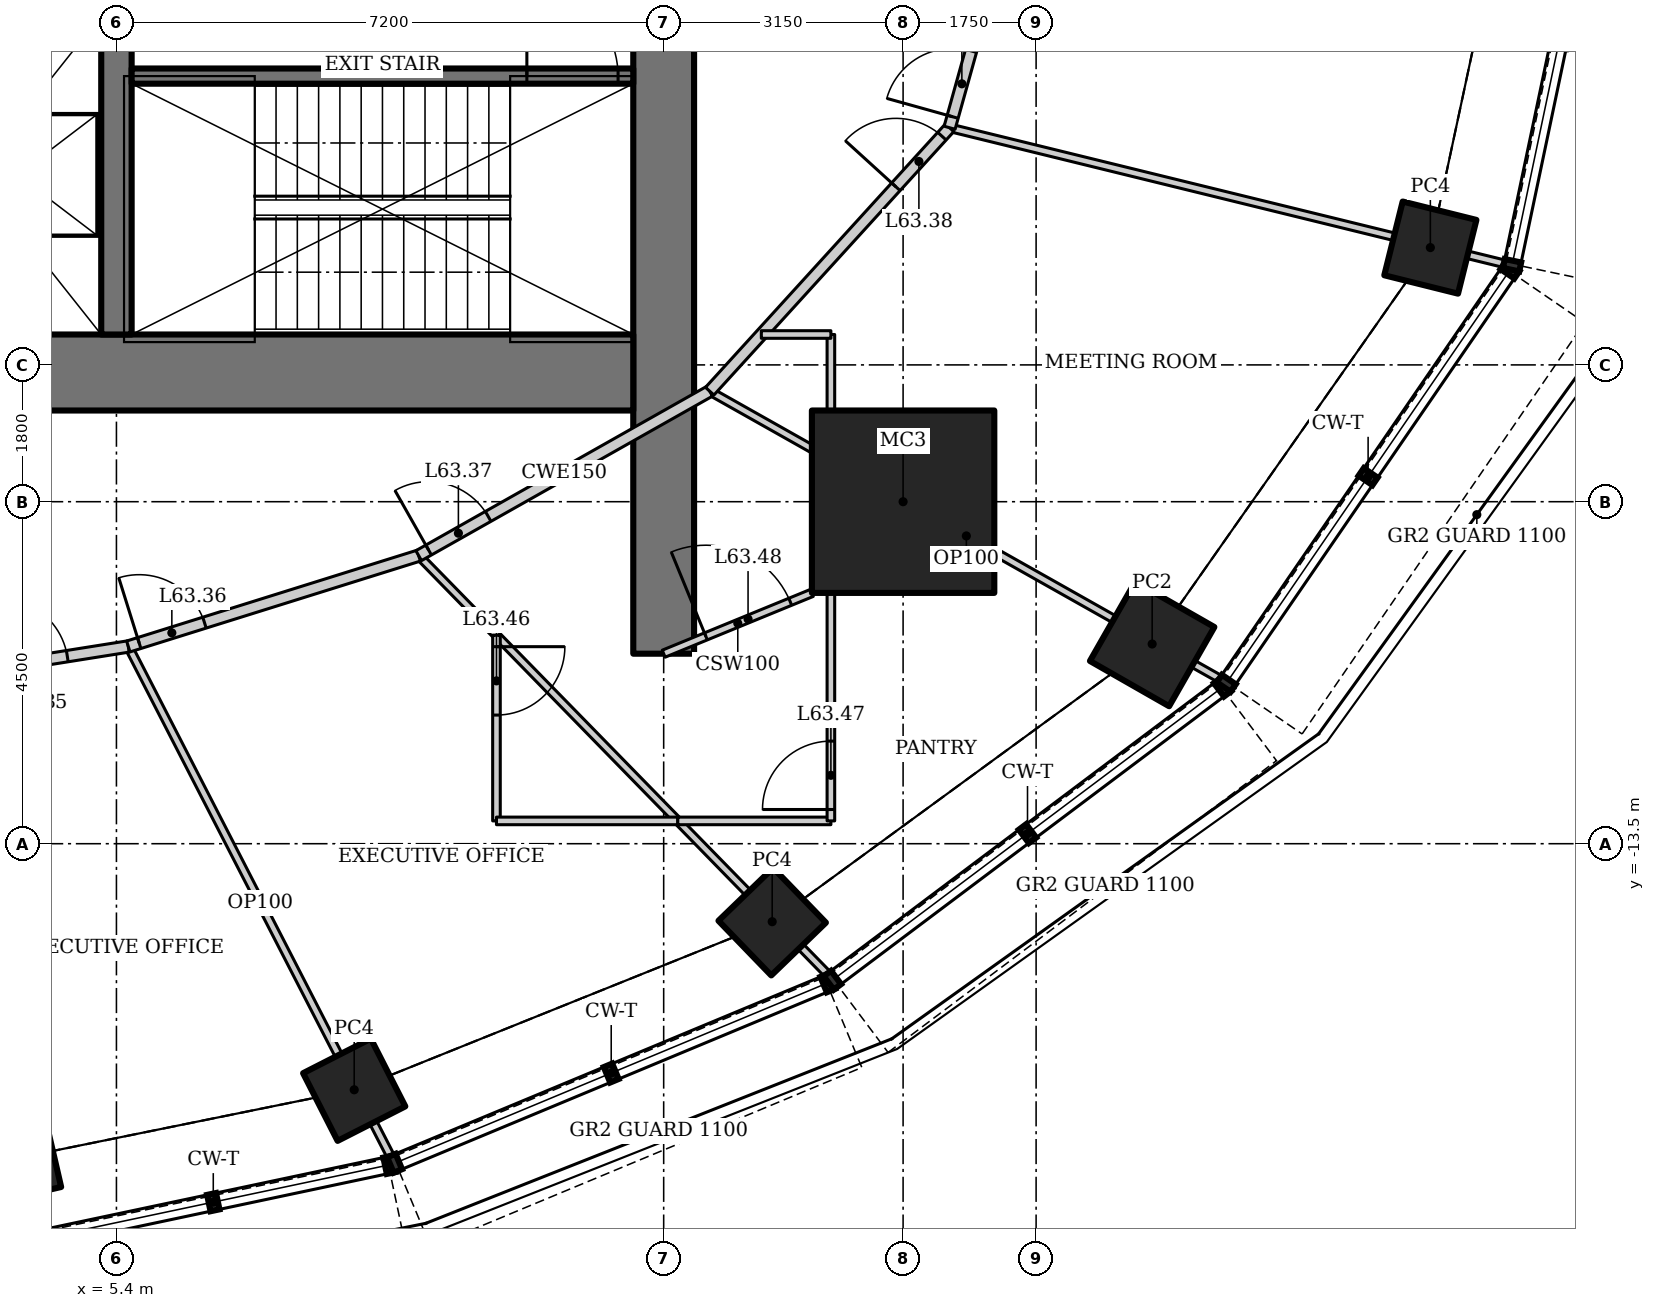
"""IFC4 building model, lengths in metres.
Left out: names, types, materials, properties, quantities, classifications, styles, units other than length and angle.
Written with IfcOpenShell. Run it as: python <this file> out.ifc"""

import sys

from ifc_helpers import new_model, si_unit, direction, frame, frame_2d, origin, origin_2d, place, context, subcontext, project, spatial, rectangle, hollow_rectangle, extrude, element, fill, save


model = new_model("IFC4")
c1 = context("Model", 3, precision=1e-05, world=origin(), true_north=direction((0.0, 1.0)))
c2 = subcontext(c1, "Body", "Model", "MODEL_VIEW")
j1 = project(units=[si_unit("LENGTHUNIT", "METRE"), si_unit("PLANEANGLEUNIT", "RADIAN")], contexts=[c1])
p1 = place(None, origin())
s1 = spatial("IfcSite", under=j1, at=p1, CompositionType="ELEMENT")
p2 = place(p1, origin())
s2 = spatial("IfcBuilding", under=s1, at=p2, CompositionType="ELEMENT")
p3 = place(p2, frame((0.0, 0.0, 270.4)))
s3 = spatial("IfcBuildingStorey", under=s2, at=p3, CompositionType="ELEMENT", Elevation=270.4)
p4 = place(p3, frame((15.75, -9.0, 0.0), z_axis=(0.0, 0.0, 1.0), x_axis=(1.0, 0.0, 0.0)))
e1 = element("IfcColumn", 1, at=p4, inside=s3, PredefinedType="COLUMN", context=c2, shape_type="SweptSolid", body=[
    extrude(hollow_rectangle(XDim=2.4, YDim=2.4, WallThickness=0.12, at=origin_2d()), origin(), (0.0, 0.0, 1.0), 4.5),
])
p5 = place(p3, frame((4.073, -17.642, 0.979), z_axis=(0.0, 0.0, 1.0), x_axis=(0.974370064785, 0.224951054344, 0.0)))
e2 = element("IfcColumn", 2, at=p5, inside=s3, PredefinedType="COLUMN", context=c2, shape_type="SweptSolid", body=[
    extrude(hollow_rectangle(XDim=1.0, YDim=1.0, WallThickness=0.08, at=origin_2d()), origin(), (0.0, 0.0, 1.0), 3.521),
])
p6 = place(p3, frame((8.528, -16.738, 0.969), z_axis=(0.0, 0.0, 1.0), x_axis=(0.891006524188, 0.45399049974, 0.0)))
e3 = element("IfcColumn", 3, at=p6, inside=s3, PredefinedType="COLUMN", context=c2, shape_type="SweptSolid", body=[
    extrude(hollow_rectangle(XDim=1.0, YDim=1.0, WallThickness=0.08, at=origin_2d()), origin(), (0.0, 0.0, 1.0), 3.531),
])
p7 = place(p3, frame((14.028, -14.526, 0.947), z_axis=(0.0, 0.0, 1.0), x_axis=(0.719339800339, 0.694658370459, 0.0)))
e4 = element("IfcColumn", 4, at=p7, inside=s3, PredefinedType="COLUMN", context=c2, shape_type="SweptSolid", body=[
    extrude(hollow_rectangle(XDim=1.0, YDim=1.0, WallThickness=0.08, at=origin_2d()), origin(), (0.0, 0.0, 1.0), 3.553),
])
p8 = place(p3, frame((19.027, -10.873, 1.103), z_axis=(0.0, 0.0, 1.0), x_axis=(0.496139221777, 0.86824298017, 0.0)))
e5 = element("IfcColumn", 5, at=p8, inside=s3, PredefinedType="COLUMN", context=c2, shape_type="SweptSolid", body=[
    extrude(hollow_rectangle(XDim=1.2, YDim=1.2, WallThickness=0.1, at=origin_2d()), origin(), (0.0, 0.0, 1.0), 3.397),
])
p9 = place(p3, frame((22.687, -5.656, 0.892), z_axis=(0.0, 0.0, 1.0), x_axis=(0.2419218956, 0.970295726276, 0.0)))
e6 = element("IfcColumn", 6, at=p9, inside=s3, PredefinedType="COLUMN", context=c2, shape_type="SweptSolid", body=[
    extrude(hollow_rectangle(XDim=1.0, YDim=1.0, WallThickness=0.08, at=origin_2d()), origin(), (0.0, 0.0, 1.0), 3.608),
])
p10 = place(p3, frame((12.6, -11.0, 0.0), z_axis=(0.0, 0.0, 1.0), x_axis=(0.0, 1.0, 0.0)))
e7 = element("IfcWall", 7, at=p10, inside=s3, PredefinedType="SHEAR", context=c2, shape_type="SweptSolid", body=[
    extrude(rectangle(XDim=22.0, YDim=0.8, at=frame_2d((11.0, 0.0))), origin(), (0.0, 0.0, 1.0), 4.5),
])
p11 = place(p10, frame((10.1, 0.0, 0.0)))
e8 = element("IfcOpeningElement", 8, at=p11, cuts=e7, PredefinedType="OPENING", context=c2, shape_type="SweptSolid", body=[
    extrude(rectangle(XDim=1.8, YDim=2.1, at=frame_2d((0.9, 1.05))), frame((0.0, 0.41, 0.0), z_axis=(0.0, -1.0, 0.0), x_axis=(1.0, 0.0, 0.0)), (0.0, 0.0, 1.0), 0.82),
])
p12 = place(p3, frame((-12.2, -7.3, 0.0), z_axis=(0.0, 0.0, 1.0), x_axis=(1.0, 0.0, 0.0)))
e9 = element("IfcWall", 9, at=p12, inside=s3, PredefinedType="SHEAR", context=c2, shape_type="SweptSolid", body=[
    extrude(rectangle(XDim=24.4, YDim=1.0, at=frame_2d((12.2, 0.0))), origin(), (0.0, 0.0, 1.0), 4.5),
])
p13 = place(p3, frame((5.4, -6.8, 0.0), z_axis=(0.0, 0.0, 1.0), x_axis=(0.0, 1.0, 0.0)))
e10 = element("IfcWall", 10, at=p13, inside=s3, PredefinedType="SHEAR", context=c2, shape_type="SweptSolid", body=[
    extrude(rectangle(XDim=14.6, YDim=0.4, at=frame_2d((7.3, 0.0))), origin(), (0.0, 0.0, 1.0), 4.5),
])
p14 = place(p13, frame((5.9, 0.0, 0.0)))
e11 = element("IfcOpeningElement", 11, at=p14, cuts=e10, PredefinedType="OPENING", context=c2, shape_type="SweptSolid", body=[
    extrude(rectangle(XDim=1.8, YDim=2.1, at=frame_2d((0.9, 1.05))), frame((0.0, 0.21, 0.0), z_axis=(0.0, -1.0, 0.0), x_axis=(1.0, 0.0, 0.0)), (0.0, 0.0, 1.0), 0.42),
])
p15 = place(p3, frame((5.6, -3.4, 0.0), z_axis=(0.0, 0.0, 1.0), x_axis=(1.0, 0.0, 0.0)))
e12 = element("IfcWall", 12, at=p15, inside=s3, PredefinedType="SHEAR", context=c2, shape_type="SweptSolid", body=[
    extrude(rectangle(XDim=6.6, YDim=0.2, at=frame_2d((3.3, 0.0))), origin(), (0.0, 0.0, 1.0), 4.5),
])
p16 = place(p15, frame((5.2, 0.0, 0.0)))
e13 = element("IfcOpeningElement", 13, at=p16, cuts=e12, PredefinedType="OPENING", context=c2, shape_type="SweptSolid", body=[
    extrude(rectangle(XDim=1.2, YDim=2.1, at=frame_2d((0.6, 1.05))), frame((0.0, 0.11, 0.0), z_axis=(0.0, -1.0, 0.0), x_axis=(1.0, 0.0, 0.0)), (0.0, 0.0, 1.0), 0.22),
])
p17 = place(p3, frame((9.031, -17.657, 0.0), z_axis=(0.0, 0.0, 1.0), x_axis=(-0.457536153323, 0.889191019074, 0.0)))
e14 = element("IfcWall", 14, at=p17, inside=s3, PredefinedType="PARTITIONING", context=c2, shape_type="SweptSolid", body=[
    extrude(rectangle(XDim=7.594, YDim=0.1, at=frame_2d((3.797, 0.0))), origin(), (0.0, 0.0, 1.0), 3.593),
])
p18 = place(p3, frame((14.789, -15.251, 0.0), z_axis=(0.0, 0.0, 1.0), x_axis=(-0.698752653188, 0.71536335499, 0.0)))
e15 = element("IfcWall", 15, at=p18, inside=s3, PredefinedType="PARTITIONING", context=c2, shape_type="SweptSolid", body=[
    extrude(rectangle(XDim=7.746, YDim=0.1, at=frame_2d((3.873, 0.0))), origin(), (0.0, 0.0, 1.0), 3.723),
])
p19 = place(p3, frame((19.959, -11.355, 0.0), z_axis=(0.0, 0.0, 1.0), x_axis=(-0.871035125561, 0.491220734537, 0.0)))
e16 = element("IfcWall", 16, at=p19, inside=s3, PredefinedType="PARTITIONING", context=c2, shape_type="SweptSolid", body=[
    extrude(rectangle(XDim=7.753, YDim=0.1, at=frame_2d((3.877, 0.0))), origin(), (0.0, 0.0, 1.0), 3.824),
])
p20 = place(p3, frame((23.707, -5.881, 0.0), z_axis=(0.0, 0.0, 1.0), x_axis=(-0.971215212425, 0.238203717759, 0.0)))
e17 = element("IfcWall", 17, at=p20, inside=s3, PredefinedType="PARTITIONING", context=c2, shape_type="SweptSolid", body=[
    extrude(rectangle(XDim=7.563, YDim=0.1, at=frame_2d((3.781, 0.0))), origin(), (0.0, 0.0, 1.0), 3.408),
])
p21 = place(p3, frame((2.625, -11.37, 0.0), z_axis=(0.0, 0.0, 1.0), x_axis=(0.987659371348, 0.156617260185, 0.0)))
e18 = element("IfcWall", 18, at=p21, inside=s3, PredefinedType="PARTITIONING", context=c2, shape_type="SweptSolid", body=[
    extrude(rectangle(XDim=2.968, YDim=0.15, at=frame_2d((1.484, 0.0))), origin(), (0.0, 0.0, 1.0), 4.35),
])
p22 = place(p21, frame((1.255, 0.0, 0.0)))
e19 = element("IfcOpeningElement", 19, at=p22, cuts=e18, PredefinedType="OPENING", context=c2, shape_type="SweptSolid", body=[
    extrude(rectangle(XDim=0.9, YDim=2.1, at=frame_2d((0.45, 1.05))), frame((0.0, 0.085, 0.0), z_axis=(0.0, -1.0, 0.0), x_axis=(1.0, 0.0, 0.0)), (0.0, 0.0, 1.0), 0.17),
])
p23 = place(p3, frame((5.556, -10.905, 0.0), z_axis=(0.0, 0.0, 1.0), x_axis=(0.954393117131, 0.298552806004, 0.0)))
e20 = element("IfcWall", 20, at=p23, inside=s3, PredefinedType="PARTITIONING", context=c2, shape_type="SweptSolid", body=[
    extrude(rectangle(XDim=4.003, YDim=0.15, at=frame_2d((2.001, 0.0))), origin(), (0.0, 0.0, 1.0), 4.35),
])
p24 = place(p23, frame((0.15, 0.0, 0.0)))
e21 = element("IfcOpeningElement", 21, at=p24, cuts=e20, PredefinedType="OPENING", context=c2, shape_type="SweptSolid", body=[
    extrude(rectangle(XDim=0.9, YDim=2.1, at=frame_2d((0.45, 1.05))), frame((0.0, 0.085, 0.0), z_axis=(0.0, -1.0, 0.0), x_axis=(1.0, 0.0, 0.0)), (0.0, 0.0, 1.0), 0.17),
])
p25 = place(p3, frame((9.377, -9.71, 0.0), z_axis=(0.0, 0.0, 1.0), x_axis=(0.870593853694, 0.492002379984, 0.0)))
e22 = element("IfcWall", 22, at=p25, inside=s3, PredefinedType="PARTITIONING", context=c2, shape_type="SweptSolid", body=[
    extrude(rectangle(XDim=4.398, YDim=0.15, at=frame_2d((2.199, 0.0))), origin(), (0.0, 0.0, 1.0), 4.35),
])
p26 = place(p25, frame((0.15, 0.0, 0.0)))
e23 = element("IfcOpeningElement", 23, at=p26, cuts=e22, PredefinedType="OPENING", context=c2, shape_type="SweptSolid", body=[
    extrude(rectangle(XDim=0.9, YDim=2.1, at=frame_2d((0.45, 1.05))), frame((0.0, 0.085, 0.0), z_axis=(0.0, -1.0, 0.0), x_axis=(1.0, 0.0, 0.0)), (0.0, 0.0, 1.0), 0.17),
])
p27 = place(p3, frame((13.206, -7.546, 0.0), z_axis=(0.0, 0.0, 1.0), x_axis=(0.67323765707, 0.739426167445, 0.0)))
e24 = element("IfcWall", 24, at=p27, inside=s3, PredefinedType="PARTITIONING", context=c2, shape_type="SweptSolid", body=[
    extrude(rectangle(XDim=4.688, YDim=0.15, at=frame_2d((2.344, 0.0))), origin(), (0.0, 0.0, 1.0), 4.35),
])
p28 = place(p27, frame((3.638, 0.0, 0.0)))
e25 = element("IfcOpeningElement", 25, at=p28, cuts=e24, PredefinedType="OPENING", context=c2, shape_type="SweptSolid", body=[
    extrude(rectangle(XDim=0.9, YDim=2.1, at=frame_2d((0.45, 1.05))), frame((0.0, 0.085, 0.0), z_axis=(0.0, -1.0, 0.0), x_axis=(1.0, 0.0, 0.0)), (0.0, 0.0, 1.0), 0.17),
])
p29 = place(p3, frame((16.362, -4.08, 0.0), z_axis=(0.0, 0.0, 1.0), x_axis=(0.268731808547, 0.963215040931, 0.0)))
e26 = element("IfcWall", 26, at=p29, inside=s3, PredefinedType="PARTITIONING", context=c2, shape_type="SweptSolid", body=[
    extrude(rectangle(XDim=4.235, YDim=0.15, at=frame_2d((2.118, 0.0))), origin(), (0.0, 0.0, 1.0), 4.35),
])
p30 = place(p29, frame((0.15, 0.0, 0.0)))
e27 = element("IfcOpeningElement", 27, at=p30, cuts=e26, PredefinedType="OPENING", context=c2, shape_type="SweptSolid", body=[
    extrude(rectangle(XDim=0.9, YDim=2.1, at=frame_2d((0.45, 1.05))), frame((0.0, 0.085, 0.0), z_axis=(0.0, -1.0, 0.0), x_axis=(1.0, 0.0, 0.0)), (0.0, 0.0, 1.0), 0.17),
])
p31 = place(p3, frame((10.4, -10.758, 0.0), z_axis=(0.0, 0.0, 1.0), x_axis=(0.0, -1.0, 0.0)))
e28 = element("IfcWall", 28, at=p31, inside=s3, PredefinedType="PARTITIONING", context=c2, shape_type="SweptSolid", body=[
    extrude(rectangle(XDim=2.442, YDim=0.1, at=frame_2d((1.221, 0.0))), origin(), (0.0, 0.0, 1.0), 4.35),
])
p32 = place(p31, frame((0.15, 0.0, 0.0)))
e29 = element("IfcOpeningElement", 29, at=p32, cuts=e28, PredefinedType="OPENING", context=c2, shape_type="SweptSolid", body=[
    extrude(rectangle(XDim=0.9, YDim=2.1, at=frame_2d((0.45, 1.05))), frame((0.0, 0.06, 0.0), z_axis=(0.0, -1.0, 0.0), x_axis=(1.0, 0.0, 0.0)), (0.0, 0.0, 1.0), 0.12),
])
p33 = place(p3, frame((10.4, -13.2, 0.0), z_axis=(0.0, 0.0, 1.0), x_axis=(1.0, 0.0, 0.0)))
e30 = element("IfcWall", 30, at=p33, inside=s3, PredefinedType="PARTITIONING", context=c2, shape_type="SweptSolid", body=[
    extrude(rectangle(XDim=2.386, YDim=0.1, at=frame_2d((1.193, 0.0))), origin(), (0.0, 0.0, 1.0), 4.35),
])
p34 = place(p3, frame((12.786, -13.2, 0.0), z_axis=(0.0, 0.0, 1.0), x_axis=(1.0, 0.0, 0.0)))
e31 = element("IfcWall", 31, at=p34, inside=s3, PredefinedType="PARTITIONING", context=c2, shape_type="SweptSolid", body=[
    extrude(rectangle(XDim=2.014, YDim=0.1, at=frame_2d((1.007, 0.0))), origin(), (0.0, 0.0, 1.0), 4.35),
])
p35 = place(p3, frame((14.8, -13.2, 0.0), z_axis=(0.0, 0.0, 1.0), x_axis=(0.0, 1.0, 0.0)))
e32 = element("IfcWall", 32, at=p35, inside=s3, PredefinedType="PARTITIONING", context=c2, shape_type="SweptSolid", body=[
    extrude(rectangle(XDim=4.755, YDim=0.1, at=frame_2d((2.377, 0.0))), origin(), (0.0, 0.0, 1.0), 4.35),
])
p36 = place(p35, frame((0.15, 0.0, 0.0)))
e33 = element("IfcOpeningElement", 33, at=p36, cuts=e32, PredefinedType="OPENING", context=c2, shape_type="SweptSolid", body=[
    extrude(rectangle(XDim=0.9, YDim=2.1, at=frame_2d((0.45, 1.05))), frame((0.0, 0.06, 0.0), z_axis=(0.0, -1.0, 0.0), x_axis=(1.0, 0.0, 0.0)), (0.0, 0.0, 1.0), 0.12),
])
p37 = place(p3, frame((14.8, -8.445, 0.0), z_axis=(0.0, 0.0, 1.0), x_axis=(0.0, 1.0, 0.0)))
e34 = element("IfcWall", 34, at=p37, inside=s3, PredefinedType="PARTITIONING", context=c2, shape_type="SweptSolid", body=[
    extrude(rectangle(XDim=1.645, YDim=0.1, at=frame_2d((0.823, 0.0))), origin(), (0.0, 0.0, 1.0), 4.35),
])
p38 = place(p3, frame((14.8, -6.8, 0.0), z_axis=(0.0, 0.0, 1.0), x_axis=(-1.0, 0.0, 0.0)))
e35 = element("IfcWall", 35, at=p38, inside=s3, PredefinedType="PARTITIONING", context=c2, shape_type="SweptSolid", body=[
    extrude(rectangle(XDim=0.915, YDim=0.1, at=frame_2d((0.458, 0.0))), origin(), (0.0, 0.0, 1.0), 4.35),
])
p39 = place(p3, frame((12.6, -11.0, 0.0), z_axis=(0.0, 0.0, 1.0), x_axis=(0.925157145479, 0.379584320237, 0.0)))
e36 = element("IfcWall", 36, at=p39, inside=s3, PredefinedType="PARTITIONING", context=c2, shape_type="SweptSolid", body=[
    extrude(rectangle(XDim=2.108, YDim=0.1, at=frame_2d((1.054, 0.0))), origin(), (0.0, 0.0, 1.0), 4.35),
])
p40 = place(p39, frame((0.6, 0.0, 0.0)))
e37 = element("IfcOpeningElement", 37, at=p40, cuts=e36, PredefinedType="OPENING", context=c2, shape_type="SweptSolid", body=[
    extrude(rectangle(XDim=1.2, YDim=2.1, at=frame_2d((0.6, 1.05))), frame((0.0, 0.06, 0.0), z_axis=(0.0, -1.0, 0.0), x_axis=(1.0, 0.0, 0.0)), (0.0, 0.0, 1.0), 0.12),
])
p41 = place(p16, origin())
e38 = element("IfcDoor", 38, at=p41, inside=s3, OperationType="SINGLE_SWING_RIGHT", PredefinedType="DOOR", context=c2, shape_type="SweptSolid", body=[
    extrude(rectangle(XDim=1.2, YDim=2.1, at=frame_2d((0.6, 1.05))), frame((0.0, 0.025, 0.0), z_axis=(0.0, -1.0, 0.0), x_axis=(1.0, 0.0, 0.0)), (0.0, 0.0, 1.0), 0.05),
])
fill(e13, e38)
p42 = place(p22, origin())
e39 = element("IfcDoor", 39, at=p42, inside=s3, OperationType="SINGLE_SWING_LEFT", PredefinedType="DOOR", context=c2, shape_type="SweptSolid", body=[
    extrude(rectangle(XDim=0.9, YDim=2.1, at=frame_2d((0.45, 1.05))), frame((0.0, 0.025, 0.0), z_axis=(0.0, -1.0, 0.0), x_axis=(1.0, 0.0, 0.0)), (0.0, 0.0, 1.0), 0.05),
])
fill(e19, e39)
p43 = place(p24, origin())
e40 = element("IfcDoor", 40, at=p43, inside=s3, OperationType="SINGLE_SWING_LEFT", PredefinedType="DOOR", context=c2, shape_type="SweptSolid", body=[
    extrude(rectangle(XDim=0.9, YDim=2.1, at=frame_2d((0.45, 1.05))), frame((0.0, 0.025, 0.0), z_axis=(0.0, -1.0, 0.0), x_axis=(1.0, 0.0, 0.0)), (0.0, 0.0, 1.0), 0.05),
])
fill(e21, e40)
p44 = place(p26, origin())
e41 = element("IfcDoor", 41, at=p44, inside=s3, OperationType="SINGLE_SWING_LEFT", PredefinedType="DOOR", context=c2, shape_type="SweptSolid", body=[
    extrude(rectangle(XDim=0.9, YDim=2.1, at=frame_2d((0.45, 1.05))), frame((0.0, 0.025, 0.0), z_axis=(0.0, -1.0, 0.0), x_axis=(1.0, 0.0, 0.0)), (0.0, 0.0, 1.0), 0.05),
])
fill(e23, e41)
p45 = place(p28, origin())
e42 = element("IfcDoor", 42, at=p45, inside=s3, OperationType="SINGLE_SWING_LEFT", PredefinedType="DOOR", context=c2, shape_type="SweptSolid", body=[
    extrude(rectangle(XDim=0.9, YDim=2.1, at=frame_2d((0.45, 1.05))), frame((0.0, 0.025, 0.0), z_axis=(0.0, -1.0, 0.0), x_axis=(1.0, 0.0, 0.0)), (0.0, 0.0, 1.0), 0.05),
])
fill(e25, e42)
p46 = place(p30, origin())
e43 = element("IfcDoor", 43, at=p46, inside=s3, OperationType="SINGLE_SWING_LEFT", PredefinedType="DOOR", context=c2, shape_type="SweptSolid", body=[
    extrude(rectangle(XDim=0.9, YDim=2.1, at=frame_2d((0.45, 1.05))), frame((0.0, 0.025, 0.0), z_axis=(0.0, -1.0, 0.0), x_axis=(1.0, 0.0, 0.0)), (0.0, 0.0, 1.0), 0.05),
])
fill(e27, e43)
p47 = place(p32, origin())
e44 = element("IfcDoor", 44, at=p47, inside=s3, OperationType="SINGLE_SWING_LEFT", PredefinedType="DOOR", context=c2, shape_type="SweptSolid", body=[
    extrude(rectangle(XDim=0.9, YDim=2.1, at=frame_2d((0.45, 1.05))), frame((0.0, 0.025, 0.0), z_axis=(0.0, -1.0, 0.0), x_axis=(1.0, 0.0, 0.0)), (0.0, 0.0, 1.0), 0.05),
])
fill(e29, e44)
p48 = place(p36, origin())
e45 = element("IfcDoor", 45, at=p48, inside=s3, OperationType="SINGLE_SWING_LEFT", PredefinedType="DOOR", context=c2, shape_type="SweptSolid", body=[
    extrude(rectangle(XDim=0.9, YDim=2.1, at=frame_2d((0.45, 1.05))), frame((0.0, 0.025, 0.0), z_axis=(0.0, -1.0, 0.0), x_axis=(1.0, 0.0, 0.0)), (0.0, 0.0, 1.0), 0.05),
])
fill(e33, e45)
p49 = place(p40, origin())
e46 = element("IfcDoor", 46, at=p49, inside=s3, OperationType="DOUBLE_DOOR_DOUBLE_SWING", PredefinedType="DOOR", context=c2, shape_type="SweptSolid", body=[
    extrude(rectangle(XDim=1.2, YDim=2.1, at=frame_2d((0.6, 1.05))), frame((0.0, 0.025, 0.0), z_axis=(0.0, -1.0, 0.0), x_axis=(1.0, 0.0, 0.0)), (0.0, 0.0, 1.0), 0.05),
])
fill(e37, e46)
save(model, sys.argv[1])
